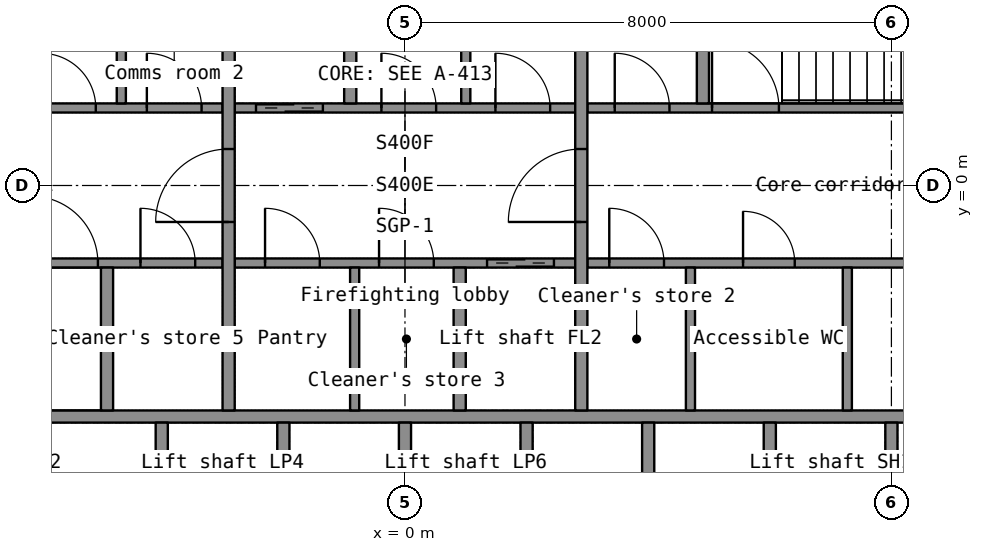
"""IFC4 building model, lengths in metres.
Left out: names, types, materials, properties, quantities, classifications, styles, units other than length and angle.
Written with IfcOpenShell. Run it as: python <this file> out.ifc"""

import sys

from ifc_helpers import new_model, si_unit, direction, frame, frame_2d, origin, place, context, subcontext, project, spatial, rectangle, extrude, element, fill, save


model = new_model("IFC4")
c1 = context("Model", 3, precision=1e-05, world=origin(), true_north=direction((0.0, 1.0)))
c2 = subcontext(c1, "Body", "Model", "MODEL_VIEW")
j1 = project(units=[si_unit("LENGTHUNIT", "METRE"), si_unit("PLANEANGLEUNIT", "RADIAN")], contexts=[c1])
p1 = place(None, origin())
s1 = spatial("IfcSite", under=j1, at=p1, CompositionType="ELEMENT")
p2 = place(p1, origin())
s2 = spatial("IfcBuilding", under=s1, at=p2, CompositionType="ELEMENT")
p3 = place(p2, frame((0.0, 0.0, 85.2)))
s3 = spatial("IfcBuildingStorey", under=s2, at=p3, CompositionType="ELEMENT", Elevation=85.2)
p4 = place(p3, frame((-11.4, -3.8, 0.0), z_axis=(0.0, 0.0, 1.0), x_axis=(1.0, 0.0, 0.0)))
e1 = element("IfcWall", 1, at=p4, inside=s3, PredefinedType="SHEAR", context=c2, shape_type="SweptSolid", body=[
    extrude(rectangle(XDim=22.8, YDim=0.2, at=frame_2d((11.4, 0.0))), origin(), (0.0, 0.0, 1.0), 7.0),
])
for number, where, z_axis, x_axis in (
    (2, (-4.0, -6.6, 0.0), (0.0, 0.0, 1.0), (0.0, 1.0, 0.0)),
    (3, (-2.0, -6.6, 0.0), (0.0, 0.0, 1.0), (0.0, 1.0, 0.0)),
    (4, (0.0, -6.6, 0.0), (0.0, 0.0, 1.0), (0.0, 1.0, 0.0)),
    (5, (2.0, -6.6, 0.0), (0.0, 0.0, 1.0), (0.0, 1.0, 0.0)),
    (6, (4.0, -6.6, 0.0), (0.0, 0.0, 1.0), (0.0, 1.0, 0.0)),
    (7, (6.0, -6.6, 0.0), (0.0, 0.0, 1.0), (0.0, 1.0, 0.0)),
    (8, (8.0, -6.6, 0.0), (0.0, 0.0, 1.0), (0.0, 1.0, 0.0)),
):
    element("IfcWall", number, at=place(p3, frame(where, z_axis=z_axis, x_axis=x_axis)), inside=s3, PredefinedType="SHEAR", context=c2, shape_type="SweptSolid", body=[
        extrude(rectangle(XDim=2.7, YDim=0.2, at=frame_2d((1.35, 0.0))), origin(), (0.0, 0.0, 1.0), 7.0),
    ])
p5 = place(p3, frame((-11.4, -1.275, 0.0), z_axis=(0.0, 0.0, 1.0), x_axis=(1.0, 0.0, 0.0)))
e9 = element("IfcWall", 9, at=p5, inside=s3, PredefinedType="SHEAR", context=c2, shape_type="SweptSolid", body=[
    extrude(rectangle(XDim=8.4, YDim=0.15, at=frame_2d((4.2, 0.0))), origin(), (0.0, 0.0, 1.0), 7.0),
])
p6 = place(p5, frame((5.25, 0.0, 0.0)))
e10 = element("IfcOpeningElement", 10, at=p6, cuts=e9, PredefinedType="OPENING", context=c2, shape_type="SweptSolid", body=[
    extrude(rectangle(XDim=1.1, YDim=2.15, at=frame_2d((0.55, 1.075))), frame((0.0, 0.085, 0.0), z_axis=(0.0, -1.0, 0.0), x_axis=(1.0, 0.0, 0.0)), (0.0, 0.0, 1.0), 0.17),
])
p7 = place(p5, frame((7.05, 0.0, 0.0)))
e11 = element("IfcOpeningElement", 11, at=p7, cuts=e9, PredefinedType="OPENING", context=c2, shape_type="SweptSolid", body=[
    extrude(rectangle(XDim=0.9, YDim=2.1, at=frame_2d((0.45, 1.05))), frame((0.0, 0.085, 0.0), z_axis=(0.0, -1.0, 0.0), x_axis=(1.0, 0.0, 0.0)), (0.0, 0.0, 1.0), 0.17),
])
p8 = place(p3, frame((-2.8, -1.275, 0.0), z_axis=(0.0, 0.0, 1.0), x_axis=(1.0, 0.0, 0.0)))
e12 = element("IfcWall", 12, at=p8, inside=s3, PredefinedType="SHEAR", context=c2, shape_type="SweptSolid", body=[
    extrude(rectangle(XDim=5.6, YDim=0.15, at=frame_2d((2.8, 0.0))), origin(), (0.0, 0.0, 1.0), 7.0),
])
p9 = place(p8, frame((4.15, 0.0, 0.0)))
e13 = element("IfcOpeningElement", 13, at=p9, cuts=e12, PredefinedType="OPENING", context=c2, shape_type="SweptSolid", body=[
    extrude(rectangle(XDim=1.1, YDim=2.2, at=frame_2d((0.55, 1.1))), frame((0.0, 0.085, 0.0), z_axis=(0.0, -1.0, 0.0), x_axis=(1.0, 0.0, 0.0)), (0.0, 0.0, 1.0), 0.17),
])
p10 = place(p8, frame((0.499, 0.0, 0.0)))
e14 = element("IfcOpeningElement", 14, at=p10, cuts=e12, PredefinedType="OPENING", context=c2, shape_type="SweptSolid", body=[
    extrude(rectangle(XDim=0.9, YDim=2.1, at=frame_2d((0.45, 1.05))), frame((0.0, 0.085, 0.0), z_axis=(0.0, -1.0, 0.0), x_axis=(1.0, 0.0, 0.0)), (0.0, 0.0, 1.0), 0.17),
])
p11 = place(p8, frame((2.374, 0.0, 0.0)))
e15 = element("IfcOpeningElement", 15, at=p11, cuts=e12, PredefinedType="OPENING", context=c2, shape_type="SweptSolid", body=[
    extrude(rectangle(XDim=0.9, YDim=2.1, at=frame_2d((0.45, 1.05))), frame((0.0, 0.085, 0.0), z_axis=(0.0, -1.0, 0.0), x_axis=(1.0, 0.0, 0.0)), (0.0, 0.0, 1.0), 0.17),
])
p12 = place(p3, frame((3.0, -1.275, 0.0), z_axis=(0.0, 0.0, 1.0), x_axis=(1.0, 0.0, 0.0)))
e16 = element("IfcWall", 16, at=p12, inside=s3, PredefinedType="PARTITIONING", context=c2, shape_type="SweptSolid", body=[
    extrude(rectangle(XDim=8.4, YDim=0.15, at=frame_2d((4.2, 0.0))), origin(), (0.0, 0.0, 1.0), 7.0),
])
p13 = place(p12, frame((0.36, 0.0, 0.0)))
e17 = element("IfcOpeningElement", 17, at=p13, cuts=e16, PredefinedType="OPENING", context=c2, shape_type="SweptSolid", body=[
    extrude(rectangle(XDim=0.9, YDim=2.1, at=frame_2d((0.45, 1.05))), frame((0.0, 0.085, 0.0), z_axis=(0.0, -1.0, 0.0), x_axis=(1.0, 0.0, 0.0)), (0.0, 0.0, 1.0), 0.17),
])
p14 = place(p12, frame((2.56, 0.0, 0.0)))
e18 = element("IfcOpeningElement", 18, at=p14, cuts=e16, PredefinedType="OPENING", context=c2, shape_type="SweptSolid", body=[
    extrude(rectangle(XDim=0.85, YDim=2.1, at=frame_2d((0.425, 1.05))), frame((0.0, 0.085, 0.0), z_axis=(0.0, -1.0, 0.0), x_axis=(1.0, 0.0, 0.0)), (0.0, 0.0, 1.0), 0.17),
])
p15 = place(p12, frame((5.95, 0.0, 0.0)))
e19 = element("IfcOpeningElement", 19, at=p15, cuts=e16, PredefinedType="OPENING", context=c2, shape_type="SweptSolid", body=[
    extrude(rectangle(XDim=0.85, YDim=2.1, at=frame_2d((0.425, 1.05))), frame((0.0, 0.085, 0.0), z_axis=(0.0, -1.0, 0.0), x_axis=(1.0, 0.0, 0.0)), (0.0, 0.0, 1.0), 0.17),
])
p16 = place(p3, frame((-11.4, 1.275, 0.0), z_axis=(0.0, 0.0, 1.0), x_axis=(1.0, 0.0, 0.0)))
e20 = element("IfcWall", 20, at=p16, inside=s3, PredefinedType="PARTITIONING", context=c2, shape_type="SweptSolid", body=[
    extrude(rectangle(XDim=8.4, YDim=0.15, at=frame_2d((4.2, 0.0))), origin(), (0.0, 0.0, 1.0), 7.0),
])
p17 = place(p16, frame((0.768, 0.0, 0.0)))
e21 = element("IfcOpeningElement", 21, at=p17, cuts=e20, PredefinedType="OPENING", context=c2, shape_type="SweptSolid", body=[
    extrude(rectangle(XDim=0.85, YDim=2.1, at=frame_2d((0.425, 1.05))), frame((0.0, 0.085, 0.0), z_axis=(0.0, -1.0, 0.0), x_axis=(1.0, 0.0, 0.0)), (0.0, 0.0, 1.0), 0.17),
])
p18 = place(p16, frame((3.302, 0.0, 0.0)))
e22 = element("IfcOpeningElement", 22, at=p18, cuts=e20, PredefinedType="OPENING", context=c2, shape_type="SweptSolid", body=[
    extrude(rectangle(XDim=0.85, YDim=2.1, at=frame_2d((0.425, 1.05))), frame((0.0, 0.085, 0.0), z_axis=(0.0, -1.0, 0.0), x_axis=(1.0, 0.0, 0.0)), (0.0, 0.0, 1.0), 0.17),
])
p19 = place(p16, frame((5.415, 0.0, 0.0)))
e23 = element("IfcOpeningElement", 23, at=p19, cuts=e20, PredefinedType="OPENING", context=c2, shape_type="SweptSolid", body=[
    extrude(rectangle(XDim=0.9, YDim=2.1, at=frame_2d((0.45, 1.05))), frame((0.0, 0.085, 0.0), z_axis=(0.0, -1.0, 0.0), x_axis=(1.0, 0.0, 0.0)), (0.0, 0.0, 1.0), 0.17),
])
p20 = place(p16, frame((7.155, 0.0, 0.0)))
e24 = element("IfcOpeningElement", 24, at=p20, cuts=e20, PredefinedType="OPENING", context=c2, shape_type="SweptSolid", body=[
    extrude(rectangle(XDim=0.9, YDim=2.1, at=frame_2d((0.45, 1.05))), frame((0.0, 0.085, 0.0), z_axis=(0.0, -1.0, 0.0), x_axis=(1.0, 0.0, 0.0)), (0.0, 0.0, 1.0), 0.17),
])
p21 = place(p3, frame((-2.8, 1.275, 0.0), z_axis=(0.0, 0.0, 1.0), x_axis=(1.0, 0.0, 0.0)))
e25 = element("IfcWall", 25, at=p21, inside=s3, PredefinedType="SHEAR", context=c2, shape_type="SweptSolid", body=[
    extrude(rectangle(XDim=5.6, YDim=0.15, at=frame_2d((2.8, 0.0))), origin(), (0.0, 0.0, 1.0), 7.0),
])
p22 = place(p21, frame((0.35, 0.0, 0.0)))
e26 = element("IfcOpeningElement", 26, at=p22, cuts=e25, PredefinedType="OPENING", context=c2, shape_type="SweptSolid", body=[
    extrude(rectangle(XDim=1.1, YDim=2.2, at=frame_2d((0.55, 1.1))), frame((0.0, 0.085, 0.0), z_axis=(0.0, -1.0, 0.0), x_axis=(1.0, 0.0, 0.0)), (0.0, 0.0, 1.0), 0.17),
])
p23 = place(p21, frame((2.413, 0.0, 0.0)))
e27 = element("IfcOpeningElement", 27, at=p23, cuts=e25, PredefinedType="OPENING", context=c2, shape_type="SweptSolid", body=[
    extrude(rectangle(XDim=0.9, YDim=2.1, at=frame_2d((0.45, 1.05))), frame((0.0, 0.085, 0.0), z_axis=(0.0, -1.0, 0.0), x_axis=(1.0, 0.0, 0.0)), (0.0, 0.0, 1.0), 0.17),
])
p24 = place(p21, frame((4.288, 0.0, 0.0)))
e28 = element("IfcOpeningElement", 28, at=p24, cuts=e25, PredefinedType="OPENING", context=c2, shape_type="SweptSolid", body=[
    extrude(rectangle(XDim=0.9, YDim=2.1, at=frame_2d((0.45, 1.05))), frame((0.0, 0.085, 0.0), z_axis=(0.0, -1.0, 0.0), x_axis=(1.0, 0.0, 0.0)), (0.0, 0.0, 1.0), 0.17),
])
p25 = place(p3, frame((3.0, 1.275, 0.0), z_axis=(0.0, 0.0, 1.0), x_axis=(1.0, 0.0, 0.0)))
e29 = element("IfcWall", 29, at=p25, inside=s3, PredefinedType="SHEAR", context=c2, shape_type="SweptSolid", body=[
    extrude(rectangle(XDim=8.4, YDim=0.15, at=frame_2d((4.2, 0.0))), origin(), (0.0, 0.0, 1.0), 7.0),
])
p26 = place(p25, frame((2.05, 0.0, 0.0)))
e30 = element("IfcOpeningElement", 30, at=p26, cuts=e29, PredefinedType="OPENING", context=c2, shape_type="SweptSolid", body=[
    extrude(rectangle(XDim=1.1, YDim=2.15, at=frame_2d((0.55, 1.075))), frame((0.0, 0.085, 0.0), z_axis=(0.0, -1.0, 0.0), x_axis=(1.0, 0.0, 0.0)), (0.0, 0.0, 1.0), 0.17),
])
p27 = place(p25, frame((0.45, 0.0, 0.0)))
e31 = element("IfcOpeningElement", 31, at=p27, cuts=e29, PredefinedType="OPENING", context=c2, shape_type="SweptSolid", body=[
    extrude(rectangle(XDim=0.9, YDim=2.1, at=frame_2d((0.45, 1.05))), frame((0.0, 0.085, 0.0), z_axis=(0.0, -1.0, 0.0), x_axis=(1.0, 0.0, 0.0)), (0.0, 0.0, 1.0), 0.17),
])
p28 = place(p3, frame((-2.9, -3.7, 0.0), z_axis=(0.0, 0.0, 1.0), x_axis=(0.0, 1.0, 0.0)))
e32 = element("IfcWall", 32, at=p28, inside=s3, PredefinedType="SHEAR", context=c2, shape_type="SweptSolid", body=[
    extrude(rectangle(XDim=7.4, YDim=0.2, at=frame_2d((3.7, 0.0))), origin(), (0.0, 0.0, 1.0), 7.0),
])
p29 = place(p28, frame((3.1, 0.0, 0.0)))
e33 = element("IfcOpeningElement", 33, at=p29, cuts=e32, PredefinedType="OPENING", context=c2, shape_type="SweptSolid", body=[
    extrude(rectangle(XDim=1.2, YDim=2.2, at=frame_2d((0.6, 1.1))), frame((0.0, 0.11, 0.0), z_axis=(0.0, -1.0, 0.0), x_axis=(1.0, 0.0, 0.0)), (0.0, 0.0, 1.0), 0.22),
])
p30 = place(p3, frame((2.9, -3.7, 0.0), z_axis=(0.0, 0.0, 1.0), x_axis=(0.0, 1.0, 0.0)))
e34 = element("IfcWall", 34, at=p30, inside=s3, PredefinedType="SHEAR", context=c2, shape_type="SweptSolid", body=[
    extrude(rectangle(XDim=7.4, YDim=0.2, at=frame_2d((3.7, 0.0))), origin(), (0.0, 0.0, 1.0), 7.0),
])
p31 = place(p30, frame((3.1, 0.0, 0.0)))
e35 = element("IfcOpeningElement", 35, at=p31, cuts=e34, PredefinedType="OPENING", context=c2, shape_type="SweptSolid", body=[
    extrude(rectangle(XDim=1.2, YDim=2.2, at=frame_2d((0.6, 1.1))), frame((0.0, 0.11, 0.0), z_axis=(0.0, -1.0, 0.0), x_axis=(1.0, 0.0, 0.0)), (0.0, 0.0, 1.0), 0.22),
])
for number, where, z_axis, x_axis in (
    (36, (-0.9, 1.35, 0.0), (0.0, 0.0, 1.0), (0.0, 1.0, 0.0)),
    (37, (0.9, -3.7, 0.0), (0.0, 0.0, 1.0), (0.0, 1.0, 0.0)),
    (38, (-4.9, -3.7, 0.0), (0.0, 0.0, 1.0), (0.0, 1.0, 0.0)),
    (39, (4.9, 1.35, 0.0), (0.0, 0.0, 1.0), (0.0, 1.0, 0.0)),
):
    element("IfcWall", number, at=place(p3, frame(where, z_axis=z_axis, x_axis=x_axis)), inside=s3, PredefinedType="SHEAR", context=c2, shape_type="SweptSolid", body=[
        extrude(rectangle(XDim=2.35, YDim=0.2, at=frame_2d((1.175, 0.0))), origin(), (0.0, 0.0, 1.0), 7.0),
    ])
for number, where, z_axis, x_axis in (
    (40, (-4.665, 1.35, 0.0), (0.0, 0.0, 1.0), (0.0, 1.0, 0.0)),
    (41, (4.695, -3.7, 0.0), (0.0, 0.0, 1.0), (0.0, 1.0, 0.0)),
    (42, (7.275, -3.7, 0.0), (0.0, 0.0, 1.0), (0.0, 1.0, 0.0)),
    (43, (1.0, 1.35, 0.0), (0.0, 0.0, 1.0), (0.0, 1.0, 0.0)),
    (44, (-0.827, -3.7, 0.0), (0.0, 0.0, 1.0), (0.0, 1.0, 0.0)),
):
    element("IfcWall", number, at=place(p3, frame(where, z_axis=z_axis, x_axis=x_axis)), inside=s3, PredefinedType="PARTITIONING", context=c2, shape_type="SweptSolid", body=[
        extrude(rectangle(XDim=2.35, YDim=0.15, at=frame_2d((1.175, 0.0))), origin(), (0.0, 0.0, 1.0), 7.0),
    ])
p32 = place(p29, origin())
e45 = element("IfcDoor", 45, at=p32, inside=s3, OperationType="SINGLE_SWING_LEFT", PredefinedType="DOOR", context=c2, shape_type="SweptSolid", body=[
    extrude(rectangle(XDim=1.2, YDim=2.2, at=frame_2d((0.6, 1.1))), frame((0.0, 0.025, 0.0), z_axis=(0.0, -1.0, 0.0), x_axis=(1.0, 0.0, 0.0)), (0.0, 0.0, 1.0), 0.05),
])
fill(e33, e45)
p33 = place(p31, origin())
e46 = element("IfcDoor", 46, at=p33, inside=s3, OperationType="SINGLE_SWING_LEFT", PredefinedType="DOOR", context=c2, shape_type="SweptSolid", body=[
    extrude(rectangle(XDim=1.2, YDim=2.2, at=frame_2d((0.6, 1.1))), frame((0.0, 0.025, 0.0), z_axis=(0.0, -1.0, 0.0), x_axis=(1.0, 0.0, 0.0)), (0.0, 0.0, 1.0), 0.05),
])
fill(e35, e46)
p34 = place(p22, origin())
e47 = element("IfcDoor", 47, at=p34, inside=s3, OperationType="DOUBLE_DOOR_SLIDING", PredefinedType="DOOR", context=c2, shape_type="SweptSolid", body=[
    extrude(rectangle(XDim=1.1, YDim=2.2, at=frame_2d((0.55, 1.1))), frame((0.0, 0.025, 0.0), z_axis=(0.0, -1.0, 0.0), x_axis=(1.0, 0.0, 0.0)), (0.0, 0.0, 1.0), 0.05),
])
fill(e26, e47)
p35 = place(p9, origin())
e48 = element("IfcDoor", 48, at=p35, inside=s3, OperationType="DOUBLE_DOOR_SLIDING", PredefinedType="DOOR", context=c2, shape_type="SweptSolid", body=[
    extrude(rectangle(XDim=1.1, YDim=2.2, at=frame_2d((0.55, 1.1))), frame((0.0, 0.025, 0.0), z_axis=(0.0, -1.0, 0.0), x_axis=(1.0, 0.0, 0.0)), (0.0, 0.0, 1.0), 0.05),
])
fill(e13, e48)
p36 = place(p6, origin())
e49 = element("IfcDoor", 49, at=p36, inside=s3, OperationType="SINGLE_SWING_LEFT", PredefinedType="DOOR", context=c2, shape_type="SweptSolid", body=[
    extrude(rectangle(XDim=1.1, YDim=2.15, at=frame_2d((0.55, 1.075))), frame((0.0, 0.025, 0.0), z_axis=(0.0, -1.0, 0.0), x_axis=(1.0, 0.0, 0.0)), (0.0, 0.0, 1.0), 0.05),
])
fill(e10, e49)
p37 = place(p26, origin())
e50 = element("IfcDoor", 50, at=p37, inside=s3, OperationType="SINGLE_SWING_LEFT", PredefinedType="DOOR", context=c2, shape_type="SweptSolid", body=[
    extrude(rectangle(XDim=1.1, YDim=2.15, at=frame_2d((0.55, 1.075))), frame((0.0, 0.025, 0.0), z_axis=(0.0, -1.0, 0.0), x_axis=(1.0, 0.0, 0.0)), (0.0, 0.0, 1.0), 0.05),
])
fill(e30, e50)
p38 = place(p19, origin())
e51 = element("IfcDoor", 51, at=p38, inside=s3, OperationType="SINGLE_SWING_LEFT", PredefinedType="DOOR", context=c2, shape_type="SweptSolid", body=[
    extrude(rectangle(XDim=0.9, YDim=2.1, at=frame_2d((0.45, 1.05))), frame((0.0, 0.025, 0.0), z_axis=(0.0, -1.0, 0.0), x_axis=(1.0, 0.0, 0.0)), (0.0, 0.0, 1.0), 0.05),
])
fill(e23, e51)
p39 = place(p20, origin())
e52 = element("IfcDoor", 52, at=p39, inside=s3, OperationType="SINGLE_SWING_LEFT", PredefinedType="DOOR", context=c2, shape_type="SweptSolid", body=[
    extrude(rectangle(XDim=0.9, YDim=2.1, at=frame_2d((0.45, 1.05))), frame((0.0, 0.025, 0.0), z_axis=(0.0, -1.0, 0.0), x_axis=(1.0, 0.0, 0.0)), (0.0, 0.0, 1.0), 0.05),
])
fill(e24, e52)
p40 = place(p13, origin())
e53 = element("IfcDoor", 53, at=p40, inside=s3, OperationType="SINGLE_SWING_LEFT", PredefinedType="DOOR", context=c2, shape_type="SweptSolid", body=[
    extrude(rectangle(XDim=0.9, YDim=2.1, at=frame_2d((0.45, 1.05))), frame((0.0, 0.025, 0.0), z_axis=(0.0, -1.0, 0.0), x_axis=(1.0, 0.0, 0.0)), (0.0, 0.0, 1.0), 0.05),
])
fill(e17, e53)
p41 = place(p14, origin())
e54 = element("IfcDoor", 54, at=p41, inside=s3, OperationType="SINGLE_SWING_LEFT", PredefinedType="DOOR", context=c2, shape_type="SweptSolid", body=[
    extrude(rectangle(XDim=0.85, YDim=2.1, at=frame_2d((0.425, 1.05))), frame((0.0, 0.025, 0.0), z_axis=(0.0, -1.0, 0.0), x_axis=(1.0, 0.0, 0.0)), (0.0, 0.0, 1.0), 0.05),
])
fill(e18, e54)
p42 = place(p23, origin())
e55 = element("IfcDoor", 55, at=p42, inside=s3, OperationType="SINGLE_SWING_LEFT", PredefinedType="DOOR", context=c2, shape_type="SweptSolid", body=[
    extrude(rectangle(XDim=0.9, YDim=2.1, at=frame_2d((0.45, 1.05))), frame((0.0, 0.025, 0.0), z_axis=(0.0, -1.0, 0.0), x_axis=(1.0, 0.0, 0.0)), (0.0, 0.0, 1.0), 0.05),
])
fill(e27, e55)
p43 = place(p24, origin())
e56 = element("IfcDoor", 56, at=p43, inside=s3, OperationType="SINGLE_SWING_LEFT", PredefinedType="DOOR", context=c2, shape_type="SweptSolid", body=[
    extrude(rectangle(XDim=0.9, YDim=2.1, at=frame_2d((0.45, 1.05))), frame((0.0, 0.025, 0.0), z_axis=(0.0, -1.0, 0.0), x_axis=(1.0, 0.0, 0.0)), (0.0, 0.0, 1.0), 0.05),
])
fill(e28, e56)
p44 = place(p10, origin())
e57 = element("IfcDoor", 57, at=p44, inside=s3, OperationType="SINGLE_SWING_LEFT", PredefinedType="DOOR", context=c2, shape_type="SweptSolid", body=[
    extrude(rectangle(XDim=0.9, YDim=2.1, at=frame_2d((0.45, 1.05))), frame((0.0, 0.025, 0.0), z_axis=(0.0, -1.0, 0.0), x_axis=(1.0, 0.0, 0.0)), (0.0, 0.0, 1.0), 0.05),
])
fill(e14, e57)
p45 = place(p11, origin())
e58 = element("IfcDoor", 58, at=p45, inside=s3, OperationType="SINGLE_SWING_LEFT", PredefinedType="DOOR", context=c2, shape_type="SweptSolid", body=[
    extrude(rectangle(XDim=0.9, YDim=2.1, at=frame_2d((0.45, 1.05))), frame((0.0, 0.025, 0.0), z_axis=(0.0, -1.0, 0.0), x_axis=(1.0, 0.0, 0.0)), (0.0, 0.0, 1.0), 0.05),
])
fill(e15, e58)
p46 = place(p27, origin())
e59 = element("IfcDoor", 59, at=p46, inside=s3, OperationType="SINGLE_SWING_LEFT", PredefinedType="DOOR", context=c2, shape_type="SweptSolid", body=[
    extrude(rectangle(XDim=0.9, YDim=2.1, at=frame_2d((0.45, 1.05))), frame((0.0, 0.025, 0.0), z_axis=(0.0, -1.0, 0.0), x_axis=(1.0, 0.0, 0.0)), (0.0, 0.0, 1.0), 0.05),
])
fill(e31, e59)
p47 = place(p7, origin())
e60 = element("IfcDoor", 60, at=p47, inside=s3, OperationType="SINGLE_SWING_LEFT", PredefinedType="DOOR", context=c2, shape_type="SweptSolid", body=[
    extrude(rectangle(XDim=0.9, YDim=2.1, at=frame_2d((0.45, 1.05))), frame((0.0, 0.025, 0.0), z_axis=(0.0, -1.0, 0.0), x_axis=(1.0, 0.0, 0.0)), (0.0, 0.0, 1.0), 0.05),
])
fill(e11, e60)
save(model, sys.argv[1])
